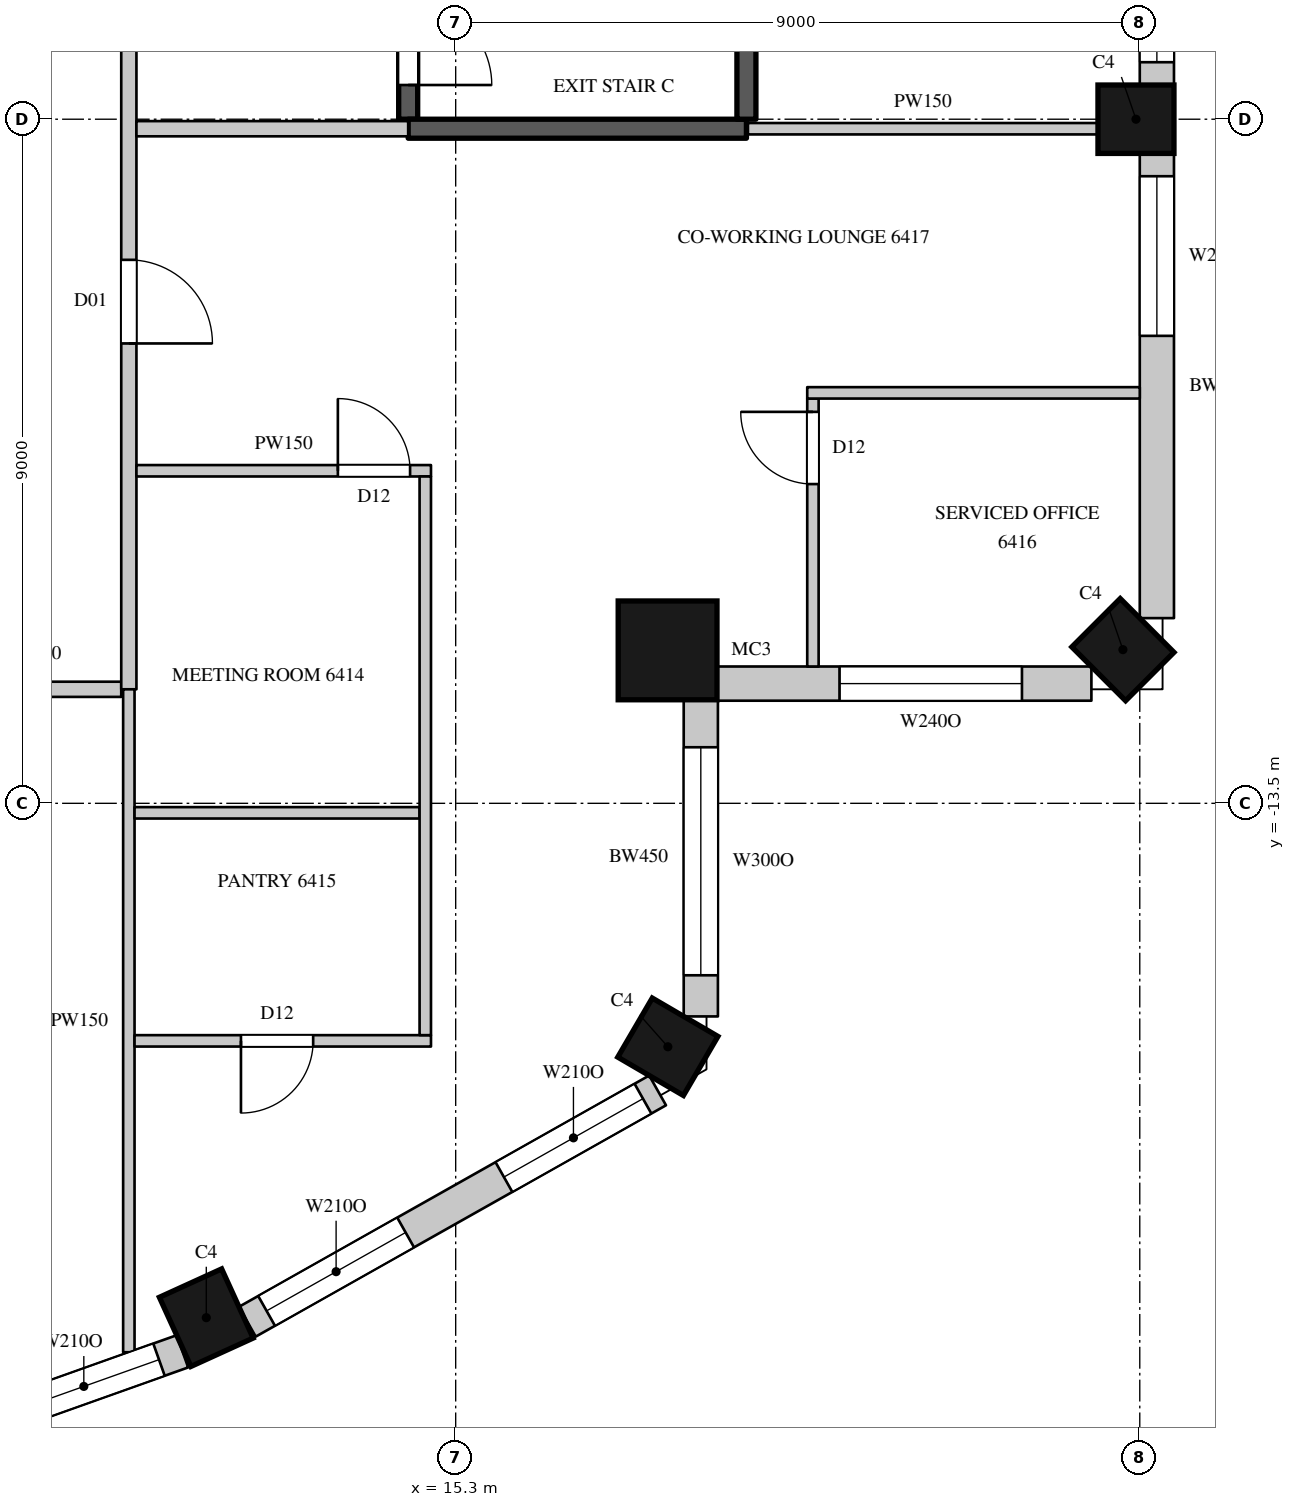
"""IFC4 building model, lengths in metres.
Left out: names, types, materials, properties, quantities, classifications, styles, units other than length and angle.
Written with IfcOpenShell. Run it as: python <this file> out.ifc"""

import sys

from ifc_helpers import new_model, si_unit, direction, frame, frame_2d, origin, origin_2d, place, context, subcontext, project, spatial, rectangle, circle, extrude, element, fill, save


model = new_model("IFC4")
c1 = context("Model", 3, precision=1e-05, world=origin(), true_north=direction((0.0, 1.0)))
c2 = subcontext(c1, "Body", "Model", "MODEL_VIEW")
j1 = project(units=[si_unit("LENGTHUNIT", "METRE"), si_unit("PLANEANGLEUNIT", "RADIAN")], contexts=[c1])
p1 = place(None, origin())
s1 = spatial("IfcSite", under=j1, at=p1, CompositionType="ELEMENT")
p2 = place(p1, origin())
s2 = spatial("IfcBuilding", under=s1, at=p2, CompositionType="ELEMENT")
p3 = place(p2, frame((0.0, 0.0, 284.4)))
s3 = spatial("IfcBuildingStorey", under=s2, at=p3, CompositionType="ELEMENT", Elevation=284.4)
for number, where, z_axis, x_axis in (
    (1, (12.019, -20.267, 0.0), (0.0, 0.0, 1.0), (0.91, 0.415, 0.0)),
    (2, (18.091, -16.703, 0.0), (0.0, 0.0, 1.0), (0.504, 0.863, 0.0)),
):
    element("IfcColumn", number, at=place(p3, frame(where, z_axis=z_axis, x_axis=x_axis)), inside=s3, PredefinedType="COLUMN", context=c2, shape_type="SweptSolid", body=[
        extrude(rectangle(XDim=0.9, YDim=1.0, at=origin_2d()), origin(), (0.0, 0.0, 1.0), 4.1),
    ])
p4 = place(p3, frame((18.088, -11.488, 0.0), z_axis=(0.0, 0.0, 1.0), x_axis=(1.0, 0.0, 0.0)))
e3 = element("IfcColumn", 3, at=p4, inside=s3, PredefinedType="COLUMN", context=c2, shape_type="SweptSolid", body=[
    extrude(circle(Radius=0.65, at=origin_2d()), origin(), (0.0, 0.0, 1.0), 4.1),
])
for number, where, z_axis, x_axis in (
    (4, (24.078, -11.478, 0.0), (0.0, 0.0, 1.0), (0.707, 0.707, 0.0)),
    (5, (24.25, -4.5, 0.0), (0.0, 0.0, 1.0), (0.0, 1.0, 0.0)),
):
    element("IfcColumn", number, at=place(p3, frame(where, z_axis=z_axis, x_axis=x_axis)), inside=s3, PredefinedType="COLUMN", context=c2, shape_type="SweptSolid", body=[
        extrude(rectangle(XDim=0.9, YDim=1.0, at=origin_2d()), origin(), (0.0, 0.0, 1.0), 4.1),
    ])
p5 = place(p3, frame((5.665, -22.859, 0.0), z_axis=(0.0, 0.0, 1.0), x_axis=(0.942108340262, 0.335308626803, 0.0)))
e6 = element("IfcWall", 6, at=p5, inside=s3, PredefinedType="SOLIDWALL", context=c2, shape_type="SweptSolid", body=[
    extrude(rectangle(XDim=6.412, YDim=0.45, at=frame_2d((3.206, 0.0))), origin(), (0.0, 0.0, 1.0), 3.8),
])
p6 = place(p5, frame((0.327, 0.0, 1.05)))
e7 = element("IfcOpeningElement", 7, at=p6, cuts=e6, PredefinedType="OPENING", context=c2, shape_type="SweptSolid", body=[
    extrude(rectangle(XDim=2.1, YDim=2.4, at=frame_2d((1.05, 1.2))), frame((0.0, 0.235, 0.0), z_axis=(0.0, -1.0, 0.0), x_axis=(1.0, 0.0, 0.0)), (0.0, 0.0, 1.0), 0.47),
])
p7 = place(p5, frame((3.985, 0.0, 1.05)))
e8 = element("IfcOpeningElement", 8, at=p7, cuts=e6, PredefinedType="OPENING", context=c2, shape_type="SweptSolid", body=[
    extrude(rectangle(XDim=2.1, YDim=2.4, at=frame_2d((1.05, 1.2))), frame((0.0, 0.235, 0.0), z_axis=(0.0, -1.0, 0.0), x_axis=(1.0, 0.0, 0.0)), (0.0, 0.0, 1.0), 0.47),
])
p8 = place(p3, frame((12.559, -20.32, 0.0), z_axis=(0.0, 0.0, 1.0), x_axis=(0.871065783524, 0.491166367714, 0.0)))
e9 = element("IfcWall", 9, at=p8, inside=s3, PredefinedType="SOLIDWALL", context=c2, shape_type="SweptSolid", body=[
    extrude(rectangle(XDim=6.196, YDim=0.45, at=frame_2d((3.098, 0.0))), origin(), (0.0, 0.0, 1.0), 3.8),
])
p9 = place(p8, frame((0.291, 0.0, 1.05)))
e10 = element("IfcOpeningElement", 10, at=p9, cuts=e9, PredefinedType="OPENING", context=c2, shape_type="SweptSolid", body=[
    extrude(rectangle(XDim=2.1, YDim=2.4, at=frame_2d((1.05, 1.2))), frame((0.0, 0.235, 0.0), z_axis=(0.0, -1.0, 0.0), x_axis=(1.0, 0.0, 0.0)), (0.0, 0.0, 1.0), 0.47),
])
p10 = place(p8, frame((3.875, 0.0, 1.05)))
e11 = element("IfcOpeningElement", 11, at=p10, cuts=e9, PredefinedType="OPENING", context=c2, shape_type="SweptSolid", body=[
    extrude(rectangle(XDim=2.1, YDim=2.4, at=frame_2d((1.05, 1.2))), frame((0.0, 0.235, 0.0), z_axis=(0.0, -1.0, 0.0), x_axis=(1.0, 0.0, 0.0)), (0.0, 0.0, 1.0), 0.47),
])
p11 = place(p3, frame((18.525, -16.304, 0.0), z_axis=(0.0, 0.0, 1.0), x_axis=(0.0, 1.0, 0.0)))
e12 = element("IfcWall", 12, at=p11, inside=s3, PredefinedType="SOLIDWALL", context=c2, shape_type="SweptSolid", body=[
    extrude(rectangle(XDim=4.202, YDim=0.45, at=frame_2d((2.101, 0.0))), origin(), (0.0, 0.0, 1.0), 3.8),
])
p12 = place(p11, frame((0.541, 0.0, 1.05)))
e13 = element("IfcOpeningElement", 13, at=p12, cuts=e12, PredefinedType="OPENING", context=c2, shape_type="SweptSolid", body=[
    extrude(rectangle(XDim=3.0, YDim=2.4, at=frame_2d((1.5, 1.2))), frame((0.0, 0.235, 0.0), z_axis=(0.0, -1.0, 0.0), x_axis=(1.0, 0.0, 0.0)), (0.0, 0.0, 1.0), 0.47),
])
p13 = place(p3, frame((18.701, -11.925, 0.0), z_axis=(0.0, 0.0, 1.0), x_axis=(1.0, 0.0, 0.0)))
e14 = element("IfcWall", 14, at=p13, inside=s3, PredefinedType="SOLIDWALL", context=c2, shape_type="SweptSolid", body=[
    extrude(rectangle(XDim=4.962, YDim=0.45, at=frame_2d((2.481, 0.0))), origin(), (0.0, 0.0, 1.0), 3.8),
])
p14 = place(p13, frame((1.648, 0.0, 1.05)))
e15 = element("IfcOpeningElement", 15, at=p14, cuts=e14, PredefinedType="OPENING", context=c2, shape_type="SweptSolid", body=[
    extrude(rectangle(XDim=2.4, YDim=2.4, at=frame_2d((1.2, 1.2))), frame((0.0, 0.235, 0.0), z_axis=(0.0, -1.0, 0.0), x_axis=(1.0, 0.0, 0.0)), (0.0, 0.0, 1.0), 0.47),
])
p15 = place(p3, frame((24.525, -11.064, 0.0), z_axis=(0.0, 0.0, 1.0), x_axis=(0.0, 1.0, 0.0)))
e16 = element("IfcWall", 16, at=p15, inside=s3, PredefinedType="SOLIDWALL", context=c2, shape_type="SweptSolid", body=[
    extrude(rectangle(XDim=6.114, YDim=0.45, at=frame_2d((3.057, 0.0))), origin(), (0.0, 0.0, 1.0), 3.8),
])
p16 = place(p15, frame((3.714, 0.0, 1.05)))
e17 = element("IfcOpeningElement", 17, at=p16, cuts=e16, PredefinedType="OPENING", context=c2, shape_type="SweptSolid", body=[
    extrude(rectangle(XDim=2.1, YDim=2.4, at=frame_2d((1.05, 1.2))), frame((0.0, 0.235, 0.0), z_axis=(0.0, -1.0, 0.0), x_axis=(1.0, 0.0, 0.0)), (0.0, 0.0, 1.0), 0.47),
])
p17 = place(p3, frame((24.525, -4.05, 0.0), z_axis=(0.0, 0.0, 1.0), x_axis=(0.0, 1.0, 0.0)))
e18 = element("IfcWall", 18, at=p17, inside=s3, PredefinedType="SOLIDWALL", context=c2, shape_type="SweptSolid", body=[
    extrude(rectangle(XDim=8.1, YDim=0.45, at=frame_2d((4.05, 0.0))), origin(), (0.0, 0.0, 1.0), 3.8),
])
p18 = place(p17, frame((0.3, 0.0, 1.05)))
e19 = element("IfcOpeningElement", 19, at=p18, cuts=e18, PredefinedType="OPENING", context=c2, shape_type="SweptSolid", body=[
    extrude(rectangle(XDim=3.0, YDim=2.4, at=frame_2d((1.5, 1.2))), frame((0.0, 0.235, 0.0), z_axis=(0.0, -1.0, 0.0), x_axis=(1.0, 0.0, 0.0)), (0.0, 0.0, 1.0), 0.47),
])
p19 = place(p17, frame((4.8, 0.0, 1.05)))
e20 = element("IfcOpeningElement", 20, at=p19, cuts=e18, PredefinedType="OPENING", context=c2, shape_type="SweptSolid", body=[
    extrude(rectangle(XDim=3.0, YDim=2.4, at=frame_2d((1.5, 1.2))), frame((0.0, 0.235, 0.0), z_axis=(0.0, -1.0, 0.0), x_axis=(1.0, 0.0, 0.0)), (0.0, 0.0, 1.0), 0.47),
])
p20 = place(p3, frame((-10.9, -12.0, 0.0), z_axis=(0.0, 0.0, 1.0), x_axis=(1.0, 0.0, 0.0)))
e21 = element("IfcWall", 21, at=p20, inside=s3, PredefinedType="PARTITIONING", context=c2, shape_type="SweptSolid", body=[
    extrude(rectangle(XDim=21.8, YDim=0.2, at=frame_2d((10.9, 0.0))), origin(), (0.0, 0.0, 1.0), 3.8),
])
p21 = place(p20, frame((1.1, 0.0, 0.0)))
e22 = element("IfcOpeningElement", 22, at=p21, cuts=e21, PredefinedType="OPENING", context=c2, shape_type="SweptSolid", body=[
    extrude(rectangle(XDim=0.9, YDim=2.2, at=frame_2d((0.45, 1.1))), frame((0.0, 0.11, 0.0), z_axis=(0.0, -1.0, 0.0), x_axis=(1.0, 0.0, 0.0)), (0.0, 0.0, 1.0), 0.22),
])
p22 = place(p20, frame((4.9, 0.0, 0.0)))
e23 = element("IfcOpeningElement", 23, at=p22, cuts=e21, PredefinedType="OPENING", context=c2, shape_type="SweptSolid", body=[
    extrude(rectangle(XDim=0.9, YDim=2.2, at=frame_2d((0.45, 1.1))), frame((0.0, 0.11, 0.0), z_axis=(0.0, -1.0, 0.0), x_axis=(1.0, 0.0, 0.0)), (0.0, 0.0, 1.0), 0.22),
])
p23 = place(p20, frame((7.0, 0.0, 0.0)))
e24 = element("IfcOpeningElement", 24, at=p23, cuts=e21, PredefinedType="OPENING", context=c2, shape_type="SweptSolid", body=[
    extrude(rectangle(XDim=0.9, YDim=2.2, at=frame_2d((0.45, 1.1))), frame((0.0, 0.11, 0.0), z_axis=(0.0, -1.0, 0.0), x_axis=(1.0, 0.0, 0.0)), (0.0, 0.0, 1.0), 0.22),
])
p24 = place(p20, frame((9.95, 0.0, 0.0)))
e25 = element("IfcOpeningElement", 25, at=p24, cuts=e21, PredefinedType="OPENING", context=c2, shape_type="SweptSolid", body=[
    extrude(rectangle(XDim=1.1, YDim=2.4, at=frame_2d((0.55, 1.2))), frame((0.0, 0.11, 0.0), z_axis=(0.0, -1.0, 0.0), x_axis=(1.0, 0.0, 0.0)), (0.0, 0.0, 1.0), 0.22),
])
p25 = place(p3, frame((11.0, -12.0, 0.0), z_axis=(0.0, 0.0, 1.0), x_axis=(0.0, 1.0, 0.0)))
e26 = element("IfcWall", 26, at=p25, inside=s3, PredefinedType="PARTITIONING", context=c2, shape_type="SweptSolid", body=[
    extrude(rectangle(XDim=24.1, YDim=0.2, at=frame_2d((12.05, 0.0))), origin(), (0.0, 0.0, 1.0), 3.8),
])
p26 = place(p25, frame((9.85, 0.0, 0.0)))
e27 = element("IfcOpeningElement", 27, at=p26, cuts=e26, PredefinedType="OPENING", context=c2, shape_type="SweptSolid", body=[
    extrude(rectangle(XDim=1.5, YDim=2.4, at=frame_2d((0.75, 1.2))), frame((0.0, 0.11, 0.0), z_axis=(0.0, -1.0, 0.0), x_axis=(1.0, 0.0, 0.0)), (0.0, 0.0, 1.0), 0.22),
])
p27 = place(p25, frame((4.55, 0.0, 0.0)))
e28 = element("IfcOpeningElement", 28, at=p27, cuts=e26, PredefinedType="OPENING", context=c2, shape_type="SweptSolid", body=[
    extrude(rectangle(XDim=1.1, YDim=2.4, at=frame_2d((0.55, 1.2))), frame((0.0, 0.11, 0.0), z_axis=(0.0, -1.0, 0.0), x_axis=(1.0, 0.0, 0.0)), (0.0, 0.0, 1.0), 0.22),
])
p28 = place(p3, frame((11.1, -4.625, 0.0), z_axis=(0.0, 0.0, 1.0), x_axis=(1.0, 0.0, 0.0)))
e29 = element("IfcWall", 29, at=p28, inside=s3, PredefinedType="PARTITIONING", context=c2, shape_type="SweptSolid", body=[
    extrude(rectangle(XDim=3.575, YDim=0.2, at=frame_2d((1.788, 0.0))), origin(), (0.0, 0.0, 1.0), 3.8),
])
p29 = place(p3, frame((11.0, -20.721, 0.0), z_axis=(0.0, 0.0, 1.0), x_axis=(0.0, 1.0, 0.0)))
e30 = element("IfcWall", 30, at=p29, inside=s3, PredefinedType="PARTITIONING", context=c2, shape_type="SweptSolid", body=[
    extrude(rectangle(XDim=8.721, YDim=0.15, at=frame_2d((4.361, 0.0))), origin(), (0.0, 0.0, 1.0), 3.8),
])
p30 = place(p3, frame((11.075, -16.625, 0.0), z_axis=(0.0, 0.0, 1.0), x_axis=(1.0, 0.0, 0.0)))
e31 = element("IfcWall", 31, at=p30, inside=s3, PredefinedType="PARTITIONING", context=c2, shape_type="SweptSolid", body=[
    extrude(rectangle(XDim=3.9, YDim=0.15, at=frame_2d((1.95, 0.0))), origin(), (0.0, 0.0, 1.0), 3.8),
])
p31 = place(p30, frame((1.4, 0.0, 0.0)))
e32 = element("IfcOpeningElement", 32, at=p31, cuts=e31, PredefinedType="OPENING", context=c2, shape_type="SweptSolid", body=[
    extrude(rectangle(XDim=0.95, YDim=2.2, at=frame_2d((0.475, 1.1))), frame((0.0, 0.085, 0.0), z_axis=(0.0, -1.0, 0.0), x_axis=(1.0, 0.0, 0.0)), (0.0, 0.0, 1.0), 0.17),
])
p32 = place(p3, frame((11.075, -13.625, 0.0), z_axis=(0.0, 0.0, 1.0), x_axis=(1.0, 0.0, 0.0)))
e33 = element("IfcWall", 33, at=p32, inside=s3, PredefinedType="PARTITIONING", context=c2, shape_type="SweptSolid", body=[
    extrude(rectangle(XDim=3.75, YDim=0.15, at=frame_2d((1.875, 0.0))), origin(), (0.0, 0.0, 1.0), 3.8),
])
p33 = place(p3, frame((11.1, -9.125, 0.0), z_axis=(0.0, 0.0, 1.0), x_axis=(1.0, 0.0, 0.0)))
e34 = element("IfcWall", 34, at=p33, inside=s3, PredefinedType="PARTITIONING", context=c2, shape_type="SweptSolid", body=[
    extrude(rectangle(XDim=3.875, YDim=0.15, at=frame_2d((1.938, 0.0))), origin(), (0.0, 0.0, 1.0), 3.8),
])
p34 = place(p33, frame((2.65, 0.0, 0.0)))
e35 = element("IfcOpeningElement", 35, at=p34, cuts=e34, PredefinedType="OPENING", context=c2, shape_type="SweptSolid", body=[
    extrude(rectangle(XDim=0.95, YDim=2.2, at=frame_2d((0.475, 1.1))), frame((0.0, 0.085, 0.0), z_axis=(0.0, -1.0, 0.0), x_axis=(1.0, 0.0, 0.0)), (0.0, 0.0, 1.0), 0.17),
])
p35 = place(p3, frame((14.9, -16.55, 0.0), z_axis=(0.0, 0.0, 1.0), x_axis=(0.0, 1.0, 0.0)))
e36 = element("IfcWall", 36, at=p35, inside=s3, PredefinedType="PARTITIONING", context=c2, shape_type="SweptSolid", body=[
    extrude(rectangle(XDim=7.35, YDim=0.15, at=frame_2d((3.675, 0.0))), origin(), (0.0, 0.0, 1.0), 3.8),
])
p36 = place(p3, frame((19.145, -4.625, 0.0), z_axis=(0.0, 0.0, 1.0), x_axis=(1.0, 0.0, 0.0)))
e37 = element("IfcWall", 37, at=p36, inside=s3, PredefinedType="PARTITIONING", context=c2, shape_type="SweptSolid", body=[
    extrude(rectangle(XDim=4.605, YDim=0.15, at=frame_2d((2.302, 0.0))), origin(), (0.0, 0.0, 1.0), 3.8),
])
p37 = place(p3, frame((20.0, -11.7, 0.0), z_axis=(0.0, 0.0, 1.0), x_axis=(0.0, 1.0, 0.0)))
e38 = element("IfcWall", 38, at=p37, inside=s3, PredefinedType="PARTITIONING", context=c2, shape_type="SweptSolid", body=[
    extrude(rectangle(XDim=3.525, YDim=0.15, at=frame_2d((1.762, 0.0))), origin(), (0.0, 0.0, 1.0), 3.8),
])
p38 = place(p37, frame((2.4, 0.0, 0.0)))
e39 = element("IfcOpeningElement", 39, at=p38, cuts=e38, PredefinedType="OPENING", context=c2, shape_type="SweptSolid", body=[
    extrude(rectangle(XDim=0.95, YDim=2.2, at=frame_2d((0.475, 1.1))), frame((0.0, 0.085, 0.0), z_axis=(0.0, -1.0, 0.0), x_axis=(1.0, 0.0, 0.0)), (0.0, 0.0, 1.0), 0.17),
])
p39 = place(p3, frame((19.925, -8.1, 0.0), z_axis=(0.0, 0.0, 1.0), x_axis=(1.0, 0.0, 0.0)))
e40 = element("IfcWall", 40, at=p39, inside=s3, PredefinedType="PARTITIONING", context=c2, shape_type="SweptSolid", body=[
    extrude(rectangle(XDim=4.375, YDim=0.15, at=frame_2d((2.188, 0.0))), origin(), (0.0, 0.0, 1.0), 3.15),
])
p40 = place(p3, frame((14.675, -4.5, 0.0), z_axis=(0.0, 0.0, 1.0), x_axis=(0.0, 1.0, 0.0)))
e41 = element("IfcWall", 41, at=p40, inside=s3, PredefinedType="SHEAR", context=c2, shape_type="SweptSolid", body=[
    extrude(rectangle(XDim=9.0, YDim=0.25, at=frame_2d((4.5, 0.0))), origin(), (0.0, 0.0, 1.0), 3.8),
])
p41 = place(p40, frame((0.45, 0.0, 0.0)))
e42 = element("IfcOpeningElement", 42, at=p41, cuts=e41, PredefinedType="OPENING", context=c2, shape_type="SweptSolid", body=[
    extrude(rectangle(XDim=1.1, YDim=2.2, at=frame_2d((0.55, 1.1))), frame((0.0, 0.135, 0.0), z_axis=(0.0, -1.0, 0.0), x_axis=(1.0, 0.0, 0.0)), (0.0, 0.0, 1.0), 0.27),
])
p42 = place(p3, frame((14.675, -4.625, 0.0), z_axis=(0.0, 0.0, 1.0), x_axis=(1.0, 0.0, 0.0)))
e43 = element("IfcWall", 43, at=p42, inside=s3, PredefinedType="SHEAR", context=c2, shape_type="SweptSolid", body=[
    extrude(rectangle(XDim=4.45, YDim=0.25, at=frame_2d((2.225, 0.0))), origin(), (0.0, 0.0, 1.0), 3.8),
])
p43 = place(p3, frame((19.125, -4.5, 0.0), z_axis=(0.0, 0.0, 1.0), x_axis=(0.0, 1.0, 0.0)))
e44 = element("IfcWall", 44, at=p43, inside=s3, PredefinedType="SHEAR", context=c2, shape_type="SweptSolid", body=[
    extrude(rectangle(XDim=9.0, YDim=0.25, at=frame_2d((4.5, 0.0))), origin(), (0.0, 0.0, 1.0), 3.8),
])
p44 = place(p7, origin())
e45 = element("IfcWindow", 45, at=p44, inside=s3, PartitioningType="SINGLE_PANEL", PredefinedType="WINDOW", context=c2, shape_type="SweptSolid", body=[
    extrude(rectangle(XDim=2.1, YDim=2.4, at=frame_2d((1.05, 1.2))), frame((0.0, 0.135, 0.0), z_axis=(0.0, -1.0, 0.0), x_axis=(1.0, 0.0, 0.0)), (0.0, 0.0, 1.0), 0.06),
])
fill(e8, e45)
p45 = place(p9, origin())
e46 = element("IfcWindow", 46, at=p45, inside=s3, PartitioningType="SINGLE_PANEL", PredefinedType="WINDOW", context=c2, shape_type="SweptSolid", body=[
    extrude(rectangle(XDim=2.1, YDim=2.4, at=frame_2d((1.05, 1.2))), frame((0.0, 0.135, 0.0), z_axis=(0.0, -1.0, 0.0), x_axis=(1.0, 0.0, 0.0)), (0.0, 0.0, 1.0), 0.06),
])
fill(e10, e46)
p46 = place(p10, origin())
e47 = element("IfcWindow", 47, at=p46, inside=s3, PartitioningType="SINGLE_PANEL", PredefinedType="WINDOW", context=c2, shape_type="SweptSolid", body=[
    extrude(rectangle(XDim=2.1, YDim=2.4, at=frame_2d((1.05, 1.2))), frame((0.0, 0.135, 0.0), z_axis=(0.0, -1.0, 0.0), x_axis=(1.0, 0.0, 0.0)), (0.0, 0.0, 1.0), 0.06),
])
fill(e11, e47)
p47 = place(p12, origin())
e48 = element("IfcWindow", 48, at=p47, inside=s3, PartitioningType="SINGLE_PANEL", PredefinedType="WINDOW", context=c2, shape_type="SweptSolid", body=[
    extrude(rectangle(XDim=3.0, YDim=2.4, at=frame_2d((1.5, 1.2))), frame((0.0, 0.135, 0.0), z_axis=(0.0, -1.0, 0.0), x_axis=(1.0, 0.0, 0.0)), (0.0, 0.0, 1.0), 0.06),
])
fill(e13, e48)
p48 = place(p16, origin())
e49 = element("IfcWindow", 49, at=p48, inside=s3, PartitioningType="SINGLE_PANEL", PredefinedType="WINDOW", context=c2, shape_type="SweptSolid", body=[
    extrude(rectangle(XDim=2.1, YDim=2.4, at=frame_2d((1.05, 1.2))), frame((0.0, 0.135, 0.0), z_axis=(0.0, -1.0, 0.0), x_axis=(1.0, 0.0, 0.0)), (0.0, 0.0, 1.0), 0.06),
])
fill(e17, e49)
p49 = place(p18, origin())
e50 = element("IfcWindow", 50, at=p49, inside=s3, PartitioningType="SINGLE_PANEL", PredefinedType="WINDOW", context=c2, shape_type="SweptSolid", body=[
    extrude(rectangle(XDim=3.0, YDim=2.4, at=frame_2d((1.5, 1.2))), frame((0.0, 0.135, 0.0), z_axis=(0.0, -1.0, 0.0), x_axis=(1.0, 0.0, 0.0)), (0.0, 0.0, 1.0), 0.06),
])
fill(e19, e50)
p50 = place(p27, origin())
e51 = element("IfcDoor", 51, at=p50, inside=s3, OperationType="SINGLE_SWING_RIGHT", PredefinedType="DOOR", context=c2, shape_type="SweptSolid", body=[
    extrude(rectangle(XDim=1.1, YDim=2.4, at=frame_2d((0.55, 1.2))), frame((0.0, 0.025, 0.0), z_axis=(0.0, -1.0, 0.0), x_axis=(1.0, 0.0, 0.0)), (0.0, 0.0, 1.0), 0.05),
])
fill(e28, e51)
p51 = place(p34, origin())
e52 = element("IfcDoor", 52, at=p51, inside=s3, OperationType="SINGLE_SWING_LEFT", PredefinedType="DOOR", context=c2, shape_type="SweptSolid", body=[
    extrude(rectangle(XDim=0.95, YDim=2.2, at=frame_2d((0.475, 1.1))), frame((0.0, 0.025, 0.0), z_axis=(0.0, -1.0, 0.0), x_axis=(1.0, 0.0, 0.0)), (0.0, 0.0, 1.0), 0.05),
])
fill(e35, e52)
p52 = place(p31, origin())
e53 = element("IfcDoor", 53, at=p52, inside=s3, OperationType="SINGLE_SWING_RIGHT", PredefinedType="DOOR", context=c2, shape_type="SweptSolid", body=[
    extrude(rectangle(XDim=0.95, YDim=2.2, at=frame_2d((0.475, 1.1))), frame((0.0, 0.025, 0.0), z_axis=(0.0, -1.0, 0.0), x_axis=(1.0, 0.0, 0.0)), (0.0, 0.0, 1.0), 0.05),
])
fill(e32, e53)
p53 = place(p38, origin())
e54 = element("IfcDoor", 54, at=p53, inside=s3, OperationType="SINGLE_SWING_RIGHT", PredefinedType="DOOR", context=c2, shape_type="SweptSolid", body=[
    extrude(rectangle(XDim=0.95, YDim=2.2, at=frame_2d((0.475, 1.1))), frame((0.0, 0.025, 0.0), z_axis=(0.0, -1.0, 0.0), x_axis=(1.0, 0.0, 0.0)), (0.0, 0.0, 1.0), 0.05),
])
fill(e39, e54)
p54 = place(p41, origin())
e55 = element("IfcDoor", 55, at=p54, inside=s3, OperationType="SINGLE_SWING_RIGHT", PredefinedType="DOOR", context=c2, shape_type="SweptSolid", body=[
    extrude(rectangle(XDim=1.1, YDim=2.2, at=frame_2d((0.55, 1.1))), frame((0.0, 0.025, 0.0), z_axis=(0.0, -1.0, 0.0), x_axis=(1.0, 0.0, 0.0)), (0.0, 0.0, 1.0), 0.05),
])
fill(e42, e55)
p55 = place(p14, origin())
e56 = element("IfcWindow", 56, at=p55, inside=s3, PartitioningType="SINGLE_PANEL", PredefinedType="WINDOW", context=c2, shape_type="SweptSolid", body=[
    extrude(rectangle(XDim=2.4, YDim=2.4, at=frame_2d((1.2, 1.2))), frame((0.0, 0.135, 0.0), z_axis=(0.0, -1.0, 0.0), x_axis=(1.0, 0.0, 0.0)), (0.0, 0.0, 1.0), 0.06),
])
fill(e15, e56)
save(model, sys.argv[1])
